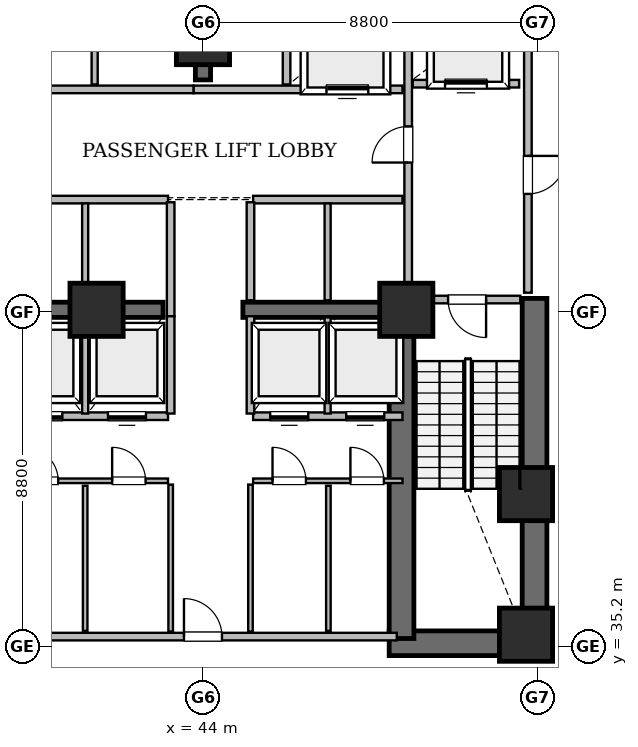
"""IFC4 building model, lengths in metres.
Left out: names, types, materials, properties, quantities, classifications, styles, units other than length and angle.
Written with IfcOpenShell. Run it as: python <this file> out.ifc"""

import sys

from ifc_helpers import new_model, si_unit, direction, frame, frame_2d, origin, origin_2d, place, context, subcontext, project, spatial, rectangle, extrude, element, fill, save


model = new_model("IFC4")
c1 = context("Model", 3, precision=1e-05, world=origin(), true_north=direction((0.0, 1.0)))
c2 = subcontext(c1, "Body", "Model", "MODEL_VIEW")
j1 = project(units=[si_unit("LENGTHUNIT", "METRE"), si_unit("PLANEANGLEUNIT", "RADIAN")], contexts=[c1])
p1 = place(None, origin())
s1 = spatial("IfcSite", under=j1, at=p1, CompositionType="ELEMENT")
p2 = place(p1, origin())
s2 = spatial("IfcBuilding", under=s1, at=p2, CompositionType="ELEMENT")
p3 = place(p2, frame((0.0, 0.0, 9.6)))
s3 = spatial("IfcBuildingStorey", under=s2, at=p3, CompositionType="ELEMENT", Elevation=9.6)
p4 = place(p3, frame((48.9, 35.275, 0.0), z_axis=(0.0, 0.0, 1.0), x_axis=(1.0, 0.0, 0.0)))
e1 = element("IfcWall", 1, at=p4, inside=s3, PredefinedType="SHEAR", context=c2, shape_type="SweptSolid", body=[
    extrude(rectangle(XDim=4.15, YDim=0.65, at=frame_2d((2.075, 0.0))), origin(), (0.0, 0.0, 1.0), 4.5),
])
p5 = place(p3, frame((52.725, 34.95, 0.0), z_axis=(0.0, 0.0, 1.0), x_axis=(0.0, 1.0, 0.0)))
e2 = element("IfcWall", 2, at=p5, inside=s3, PredefinedType="SHEAR", context=c2, shape_type="SweptSolid", body=[
    extrude(rectangle(XDim=9.4, YDim=0.65, at=frame_2d((4.7, 0.0))), origin(), (0.0, 0.0, 1.0), 4.5),
])
p6 = place(p3, frame((49.225, 35.4, 0.0), z_axis=(0.0, 0.0, 1.0), x_axis=(0.0, 1.0, 0.0)))
e3 = element("IfcWall", 3, at=p6, inside=s3, PredefinedType="SHEAR", context=c2, shape_type="SweptSolid", body=[
    extrude(rectangle(XDim=8.95, YDim=0.65, at=frame_2d((4.475, 0.0))), origin(), (0.0, 0.0, 1.0), 4.5),
])
p7 = place(p3, frame((44.0, 50.1, 0.0), z_axis=(0.0, 0.0, 1.0), x_axis=(0.0, 1.0, 0.0)))
e4 = element("IfcWall", 4, at=p7, inside=s3, PredefinedType="SHEAR", context=c2, shape_type="SweptSolid", body=[
    extrude(rectangle(XDim=2.1, YDim=0.4, at=frame_2d((1.05, 0.0))), origin(), (0.0, 0.0, 1.0), 4.5),
])
for number, where, z_axis, x_axis in (
    (5, (38.75, 44.05, 0.0), (0.0, 0.0, 1.0), (1.0, 0.0, 0.0)),
    (6, (45.05, 44.05, 0.0), (0.0, 0.0, 1.0), (1.0, 0.0, 0.0)),
):
    element("IfcWall", number, at=place(p3, frame(where, z_axis=z_axis, x_axis=x_axis)), inside=s3, PredefinedType="SHEAR", context=c2, shape_type="SweptSolid", body=[
        extrude(rectangle(XDim=4.2, YDim=0.4, at=frame_2d((2.1, 0.0))), origin(), (0.0, 0.0, 1.0), 4.5),
    ])
for number, where, z_axis, x_axis in (
    (7, (52.5, 35.5, 0.0), (0.0, 0.0, 1.0), (1.0, 0.0, 0.0)),
    (8, (52.5, 39.2, 0.0), (0.0, 0.0, 1.0), (1.0, 0.0, 0.0)),
    (9, (49.35, 44.05, 0.0), (0.0, 0.0, 1.0), (1.0, 0.0, 0.0)),
    (10, (44.0, 51.2, 0.0), (0.0, 0.0, 1.0), (1.0, 0.0, 0.0)),
    (11, (41.2, 44.05, 0.0), (0.0, 0.0, 1.0), (1.0, 0.0, 0.0)),
):
    element("IfcColumn", number, at=place(p3, frame(where, z_axis=z_axis, x_axis=x_axis)), inside=s3, PredefinedType="COLUMN", context=c2, shape_type="SweptSolid", body=[
        extrude(rectangle(XDim=1.4, YDim=1.4, at=origin_2d()), origin(), (0.0, 0.0, 1.0), 4.8),
    ])
p8 = place(p3, frame((38.9, 35.45, 0.0), z_axis=(0.0, 0.0, 1.0), x_axis=(1.0, 0.0, 0.0)))
e12 = element("IfcWall", 12, at=p8, inside=s3, PredefinedType="SOLIDWALL", context=c2, shape_type="SweptSolid", body=[
    extrude(rectangle(XDim=10.2, YDim=0.2, at=frame_2d((5.1, 0.0))), origin(), (0.0, 0.0, 1.0), 4.5),
])
p9 = place(p8, frame((4.6, 0.0, 0.0)))
e13 = element("IfcOpeningElement", 13, at=p9, cuts=e12, PredefinedType="OPENING", context=c2, shape_type="SweptSolid", body=[
    extrude(rectangle(XDim=1.0, YDim=2.15, at=frame_2d((0.5, 1.075))), frame((0.0, 0.11, 0.0), z_axis=(0.0, -1.0, 0.0), x_axis=(1.0, 0.0, 0.0)), (0.0, 0.0, 1.0), 0.22),
])
p10 = place(p3, frame((52.55, 44.5, 0.0), z_axis=(0.0, 0.0, 1.0), x_axis=(0.0, 1.0, 0.0)))
e14 = element("IfcWall", 14, at=p10, inside=s3, PredefinedType="SOLIDWALL", context=c2, shape_type="SweptSolid", body=[
    extrude(rectangle(XDim=7.92, YDim=0.2, at=frame_2d((3.96, 0.0))), origin(), (0.0, 0.0, 1.0), 4.5),
])
p11 = place(p10, frame((2.6, 0.0, 0.0)))
e15 = element("IfcOpeningElement", 15, at=p11, cuts=e14, PredefinedType="OPENING", context=c2, shape_type="SweptSolid", body=[
    extrude(rectangle(XDim=1.0, YDim=2.15, at=frame_2d((0.5, 1.075))), frame((0.0, 0.11, 0.0), z_axis=(0.0, -1.0, 0.0), x_axis=(1.0, 0.0, 0.0)), (0.0, 0.0, 1.0), 0.22),
])
p12 = place(p3, frame((49.4, 44.5, 0.0), z_axis=(0.0, 0.0, 1.0), x_axis=(0.0, 1.0, 0.0)))
e16 = element("IfcWall", 16, at=p12, inside=s3, PredefinedType="SOLIDWALL", context=c2, shape_type="SweptSolid", body=[
    extrude(rectangle(XDim=7.92, YDim=0.2, at=frame_2d((3.96, 0.0))), origin(), (0.0, 0.0, 1.0), 3.588),
])
p13 = place(p12, frame((3.425, 0.0, 0.0)))
e17 = element("IfcOpeningElement", 17, at=p13, cuts=e16, PredefinedType="OPENING", context=c2, shape_type="SweptSolid", body=[
    extrude(rectangle(XDim=0.95, YDim=2.15, at=frame_2d((0.475, 1.075))), frame((0.0, 0.11, 0.0), z_axis=(0.0, -1.0, 0.0), x_axis=(1.0, 0.0, 0.0)), (0.0, 0.0, 1.0), 0.22),
])
p14 = place(p3, frame((43.75, 49.85, 0.0), z_axis=(0.0, 0.0, 1.0), x_axis=(1.0, 0.0, 0.0)))
e18 = element("IfcWall", 18, at=p14, inside=s3, PredefinedType="SOLIDWALL", context=c2, shape_type="SweptSolid", body=[
    extrude(rectangle(XDim=5.5, YDim=0.2, at=frame_2d((2.75, 0.0))), origin(), (0.0, 0.0, 1.0), 3.588),
])
p15 = place(p14, frame((3.5, 0.0, 0.0)))
e19 = element("IfcOpeningElement", 19, at=p15, cuts=e18, PredefinedType="OPENING", context=c2, shape_type="SweptSolid", body=[
    extrude(rectangle(XDim=1.1, YDim=2.15, at=frame_2d((0.55, 1.075))), frame((0.0, 0.11, 0.0), z_axis=(0.0, -1.0, 0.0), x_axis=(1.0, 0.0, 0.0)), (0.0, 0.0, 1.0), 0.22),
])
p16 = place(p3, frame((38.75, 41.25, 0.0), z_axis=(0.0, 0.0, 1.0), x_axis=(1.0, 0.0, 0.0)))
e20 = element("IfcWall", 20, at=p16, inside=s3, PredefinedType="SOLIDWALL", context=c2, shape_type="SweptSolid", body=[
    extrude(rectangle(XDim=4.33, YDim=0.2, at=frame_2d((2.165, 0.0))), origin(), (0.0, 0.0, 1.0), 4.5),
])
p17 = place(p16, frame((0.55, 0.0, 0.0)))
e21 = element("IfcOpeningElement", 21, at=p17, cuts=e20, PredefinedType="OPENING", context=c2, shape_type="SweptSolid", body=[
    extrude(rectangle(XDim=1.0, YDim=2.15, at=frame_2d((0.5, 1.075))), frame((0.0, 0.11, 0.0), z_axis=(0.0, -1.0, 0.0), x_axis=(1.0, 0.0, 0.0)), (0.0, 0.0, 1.0), 0.22),
])
p18 = place(p16, frame((2.75, 0.0, 0.0)))
e22 = element("IfcOpeningElement", 22, at=p18, cuts=e20, PredefinedType="OPENING", context=c2, shape_type="SweptSolid", body=[
    extrude(rectangle(XDim=1.0, YDim=2.15, at=frame_2d((0.5, 1.075))), frame((0.0, 0.11, 0.0), z_axis=(0.0, -1.0, 0.0), x_axis=(1.0, 0.0, 0.0)), (0.0, 0.0, 1.0), 0.22),
])
p19 = place(p3, frame((38.75, 39.55, 0.0), z_axis=(0.0, 0.0, 1.0), x_axis=(1.0, 0.0, 0.0)))
e23 = element("IfcWall", 23, at=p19, inside=s3, PredefinedType="PARTITIONING", context=c2, shape_type="SweptSolid", body=[
    extrude(rectangle(XDim=4.33, YDim=0.12, at=frame_2d((2.165, 0.0))), origin(), (0.0, 0.0, 1.0), 4.5),
])
p20 = place(p19, frame((0.56, 0.0, 0.0)))
e24 = element("IfcOpeningElement", 24, at=p20, cuts=e23, PredefinedType="OPENING", context=c2, shape_type="SweptSolid", body=[
    extrude(rectangle(XDim=0.88, YDim=2.1, at=frame_2d((0.44, 1.05))), frame((0.0, 0.07, 0.0), z_axis=(0.0, -1.0, 0.0), x_axis=(1.0, 0.0, 0.0)), (0.0, 0.0, 1.0), 0.14),
])
p21 = place(p19, frame((2.86, 0.0, 0.0)))
e25 = element("IfcOpeningElement", 25, at=p21, cuts=e23, PredefinedType="OPENING", context=c2, shape_type="SweptSolid", body=[
    extrude(rectangle(XDim=0.88, YDim=2.1, at=frame_2d((0.44, 1.05))), frame((0.0, 0.07, 0.0), z_axis=(0.0, -1.0, 0.0), x_axis=(1.0, 0.0, 0.0)), (0.0, 0.0, 1.0), 0.14),
])
p22 = place(p3, frame((45.32, 41.25, 0.0), z_axis=(0.0, 0.0, 1.0), x_axis=(1.0, 0.0, 0.0)))
e26 = element("IfcWall", 26, at=p22, inside=s3, PredefinedType="SOLIDWALL", context=c2, shape_type="SweptSolid", body=[
    extrude(rectangle(XDim=3.93, YDim=0.2, at=frame_2d((1.965, 0.0))), origin(), (0.0, 0.0, 1.0), 4.5),
])
p23 = place(p22, frame((0.45, 0.0, 0.0)))
e27 = element("IfcOpeningElement", 27, at=p23, cuts=e26, PredefinedType="OPENING", context=c2, shape_type="SweptSolid", body=[
    extrude(rectangle(XDim=1.0, YDim=2.15, at=frame_2d((0.5, 1.075))), frame((0.0, 0.11, 0.0), z_axis=(0.0, -1.0, 0.0), x_axis=(1.0, 0.0, 0.0)), (0.0, 0.0, 1.0), 0.22),
])
p24 = place(p22, frame((2.45, 0.0, 0.0)))
e28 = element("IfcOpeningElement", 28, at=p24, cuts=e26, PredefinedType="OPENING", context=c2, shape_type="SweptSolid", body=[
    extrude(rectangle(XDim=1.0, YDim=2.15, at=frame_2d((0.5, 1.075))), frame((0.0, 0.11, 0.0), z_axis=(0.0, -1.0, 0.0), x_axis=(1.0, 0.0, 0.0)), (0.0, 0.0, 1.0), 0.22),
])
p25 = place(p3, frame((45.32, 39.55, 0.0), z_axis=(0.0, 0.0, 1.0), x_axis=(1.0, 0.0, 0.0)))
e29 = element("IfcWall", 29, at=p25, inside=s3, PredefinedType="PARTITIONING", context=c2, shape_type="SweptSolid", body=[
    extrude(rectangle(XDim=3.93, YDim=0.12, at=frame_2d((1.965, 0.0))), origin(), (0.0, 0.0, 1.0), 4.5),
])
p26 = place(p25, frame((0.51, 0.0, 0.0)))
e30 = element("IfcOpeningElement", 30, at=p26, cuts=e29, PredefinedType="OPENING", context=c2, shape_type="SweptSolid", body=[
    extrude(rectangle(XDim=0.88, YDim=2.1, at=frame_2d((0.44, 1.05))), frame((0.0, 0.07, 0.0), z_axis=(0.0, -1.0, 0.0), x_axis=(1.0, 0.0, 0.0)), (0.0, 0.0, 1.0), 0.14),
])
p27 = place(p25, frame((2.56, 0.0, 0.0)))
e31 = element("IfcOpeningElement", 31, at=p27, cuts=e29, PredefinedType="OPENING", context=c2, shape_type="SweptSolid", body=[
    extrude(rectangle(XDim=0.88, YDim=2.1, at=frame_2d((0.44, 1.05))), frame((0.0, 0.07, 0.0), z_axis=(0.0, -1.0, 0.0), x_axis=(1.0, 0.0, 0.0)), (0.0, 0.0, 1.0), 0.14),
])
p28 = place(p3, frame((49.55, 44.32, 0.0), z_axis=(0.0, 0.0, 1.0), x_axis=(1.0, 0.0, 0.0)))
e32 = element("IfcWall", 32, at=p28, inside=s3, PredefinedType="SOLIDWALL", context=c2, shape_type="SweptSolid", body=[
    extrude(rectangle(XDim=2.8, YDim=0.2, at=frame_2d((1.4, 0.0))), origin(), (0.0, 0.0, 1.0), 3.588),
])
p29 = place(p28, frame((0.9, 0.0, 0.0)))
e33 = element("IfcOpeningElement", 33, at=p29, cuts=e32, PredefinedType="OPENING", context=c2, shape_type="SweptSolid", body=[
    extrude(rectangle(XDim=1.0, YDim=2.15, at=frame_2d((0.5, 1.075))), frame((0.0, 0.11, 0.0), z_axis=(0.0, -1.0, 0.0), x_axis=(1.0, 0.0, 0.0)), (0.0, 0.0, 1.0), 0.22),
])
p30 = place(p3, frame((49.52, 50.0, 0.0), z_axis=(0.0, 0.0, 1.0), x_axis=(1.0, 0.0, 0.0)))
e34 = element("IfcWall", 34, at=p30, inside=s3, PredefinedType="SOLIDWALL", context=c2, shape_type="SweptSolid", body=[
    extrude(rectangle(XDim=2.8, YDim=0.2, at=frame_2d((1.4, 0.0))), origin(), (0.0, 0.0, 1.0), 4.5),
])
p31 = place(p30, frame((0.85, 0.0, 0.0)))
e35 = element("IfcOpeningElement", 35, at=p31, cuts=e34, PredefinedType="OPENING", context=c2, shape_type="SweptSolid", body=[
    extrude(rectangle(XDim=1.1, YDim=2.15, at=frame_2d((0.55, 1.075))), frame((0.0, 0.11, 0.0), z_axis=(0.0, -1.0, 0.0), x_axis=(1.0, 0.0, 0.0)), (0.0, 0.0, 1.0), 0.22),
])
p32 = place(p3, frame((38.75, 49.85, 0.0), z_axis=(0.0, 0.0, 1.0), x_axis=(1.0, 0.0, 0.0)))
e36 = element("IfcWall", 36, at=p32, inside=s3, PredefinedType="SOLIDWALL", context=c2, shape_type="SweptSolid", body=[
    extrude(rectangle(XDim=5.0, YDim=0.2, at=frame_2d((2.5, 0.0))), origin(), (0.0, 0.0, 1.0), 4.5),
])
p33 = place(p3, frame((38.75, 46.95, 0.0), z_axis=(0.0, 0.0, 1.0), x_axis=(1.0, 0.0, 0.0)))
e37 = element("IfcWall", 37, at=p33, inside=s3, PredefinedType="SOLIDWALL", context=c2, shape_type="SweptSolid", body=[
    extrude(rectangle(XDim=4.33, YDim=0.2, at=frame_2d((2.165, 0.0))), origin(), (0.0, 0.0, 1.0), 4.5),
])
p34 = place(p3, frame((45.32, 46.95, 0.0), z_axis=(0.0, 0.0, 1.0), x_axis=(1.0, 0.0, 0.0)))
e38 = element("IfcWall", 38, at=p34, inside=s3, PredefinedType="SOLIDWALL", context=c2, shape_type="SweptSolid", body=[
    extrude(rectangle(XDim=3.93, YDim=0.2, at=frame_2d((1.965, 0.0))), origin(), (0.0, 0.0, 1.0), 3.588),
])
for number, where, z_axis, x_axis in (
    (39, (43.15, 35.58, 0.0), (0.0, 0.0, 1.0), (0.0, 1.0, 0.0)),
    (40, (45.25, 35.58, 0.0), (0.0, 0.0, 1.0), (0.0, 1.0, 0.0)),
):
    element("IfcWall", number, at=place(p3, frame(where, z_axis=z_axis, x_axis=x_axis)), inside=s3, PredefinedType="PARTITIONING", context=c2, shape_type="SweptSolid", body=[
        extrude(rectangle(XDim=3.87, YDim=0.12, at=frame_2d((1.935, 0.0))), origin(), (0.0, 0.0, 1.0), 4.5),
    ])
for number, where, z_axis, x_axis in (
    (41, (40.9, 35.6, 0.0), (0.0, 0.0, 1.0), (0.0, 1.0, 0.0)),
    (42, (47.3, 35.6, 0.0), (0.0, 0.0, 1.0), (0.0, 1.0, 0.0)),
):
    element("IfcWall", number, at=place(p3, frame(where, z_axis=z_axis, x_axis=x_axis)), inside=s3, PredefinedType="PARTITIONING", context=c2, shape_type="SweptSolid", body=[
        extrude(rectangle(XDim=3.82, YDim=0.12, at=frame_2d((1.91, 0.0))), origin(), (0.0, 0.0, 1.0), 4.5),
    ])
p35 = place(p3, frame((43.15, 43.88, 0.0), z_axis=(0.0, 0.0, 1.0), x_axis=(0.0, 1.0, 0.0)))
e43 = element("IfcWall", 43, at=p35, inside=s3, PredefinedType="SOLIDWALL", context=c2, shape_type="SweptSolid", body=[
    extrude(rectangle(XDim=3.0, YDim=0.2, at=frame_2d((1.5, 0.0))), origin(), (0.0, 0.0, 1.0), 4.5),
])
p36 = place(p3, frame((45.25, 44.3, 0.0), z_axis=(0.0, 0.0, 1.0), x_axis=(0.0, 1.0, 0.0)))
e44 = element("IfcWall", 44, at=p36, inside=s3, PredefinedType="SOLIDWALL", context=c2, shape_type="SweptSolid", body=[
    extrude(rectangle(XDim=2.58, YDim=0.2, at=frame_2d((1.29, 0.0))), origin(), (0.0, 0.0, 1.0), 4.5),
])
for number, where, z_axis, x_axis in (
    (45, (43.15, 41.32, 0.0), (0.0, 0.0, 1.0), (0.0, 1.0, 0.0)),
    (46, (45.25, 41.32, 0.0), (0.0, 0.0, 1.0), (0.0, 1.0, 0.0)),
):
    element("IfcWall", number, at=place(p3, frame(where, z_axis=z_axis, x_axis=x_axis)), inside=s3, PredefinedType="SOLIDWALL", context=c2, shape_type="SweptSolid", body=[
        extrude(rectangle(XDim=2.56, YDim=0.2, at=frame_2d((1.28, 0.0))), origin(), (0.0, 0.0, 1.0), 4.5),
    ])
p37 = place(p3, frame((40.9, 44.3, 0.0), z_axis=(0.0, 0.0, 1.0), x_axis=(0.0, 1.0, 0.0)))
e47 = element("IfcWall", 47, at=p37, inside=s3, PredefinedType="SOLIDWALL", context=c2, shape_type="SweptSolid", body=[
    extrude(rectangle(XDim=2.55, YDim=0.16, at=frame_2d((1.275, 0.0))), origin(), (0.0, 0.0, 1.0), 4.5),
])
p38 = place(p3, frame((47.28, 44.3, 0.0), z_axis=(0.0, 0.0, 1.0), x_axis=(0.0, 1.0, 0.0)))
e48 = element("IfcWall", 48, at=p38, inside=s3, PredefinedType="SOLIDWALL", context=c2, shape_type="SweptSolid", body=[
    extrude(rectangle(XDim=2.55, YDim=0.16, at=frame_2d((1.275, 0.0))), origin(), (0.0, 0.0, 1.0), 3.588),
])
for number, where, z_axis, x_axis in (
    (49, (40.9, 41.32, 0.0), (0.0, 0.0, 1.0), (0.0, 1.0, 0.0)),
    (50, (47.28, 41.32, 0.0), (0.0, 0.0, 1.0), (0.0, 1.0, 0.0)),
):
    element("IfcWall", number, at=place(p3, frame(where, z_axis=z_axis, x_axis=x_axis)), inside=s3, PredefinedType="SOLIDWALL", context=c2, shape_type="SweptSolid", body=[
        extrude(rectangle(XDim=2.53, YDim=0.16, at=frame_2d((1.265, 0.0))), origin(), (0.0, 0.0, 1.0), 4.5),
    ])
p39 = place(p3, frame((41.15, 49.98, 0.0), z_axis=(0.0, 0.0, 1.0), x_axis=(0.0, 1.0, 0.0)))
e51 = element("IfcWall", 51, at=p39, inside=s3, PredefinedType="SOLIDWALL", context=c2, shape_type="SweptSolid", body=[
    extrude(rectangle(XDim=2.37, YDim=0.16, at=frame_2d((1.185, 0.0))), origin(), (0.0, 0.0, 1.0), 4.5),
])
p40 = place(p3, frame((46.2, 49.98, 0.0), z_axis=(0.0, 0.0, 1.0), x_axis=(0.0, 1.0, 0.0)))
e52 = element("IfcWall", 52, at=p40, inside=s3, PredefinedType="SOLIDWALL", context=c2, shape_type="SweptSolid", body=[
    extrude(rectangle(XDim=2.37, YDim=0.2, at=frame_2d((1.185, 0.0))), origin(), (0.0, 0.0, 1.0), 4.5),
])
p41 = place(p29, frame((1.0, 0.0, 0.0), z_axis=(0.0, 0.0, 1.0), x_axis=(-1.0, 0.0, 0.0)))
e53 = element("IfcDoor", 53, at=p41, inside=s3, OperationType="SINGLE_SWING_RIGHT", PredefinedType="DOOR", context=c2, shape_type="SweptSolid", body=[
    extrude(rectangle(XDim=1.0, YDim=2.15, at=frame_2d((0.5, 1.075))), frame((0.0, 0.025, 0.0), z_axis=(0.0, -1.0, 0.0), x_axis=(1.0, 0.0, 0.0)), (0.0, 0.0, 1.0), 0.05),
])
fill(e33, e53)
p42 = place(p11, frame((1.0, 0.0, 0.0), z_axis=(0.0, 0.0, 1.0), x_axis=(-1.0, 0.0, 0.0)))
e54 = element("IfcDoor", 54, at=p42, inside=s3, OperationType="SINGLE_SWING_RIGHT", PredefinedType="DOOR", context=c2, shape_type="SweptSolid", body=[
    extrude(rectangle(XDim=1.0, YDim=2.15, at=frame_2d((0.5, 1.075))), frame((0.0, 0.025, 0.0), z_axis=(0.0, -1.0, 0.0), x_axis=(1.0, 0.0, 0.0)), (0.0, 0.0, 1.0), 0.05),
])
fill(e15, e54)
p43 = place(p13, origin())
e55 = element("IfcDoor", 55, at=p43, inside=s3, OperationType="SINGLE_SWING_LEFT", PredefinedType="DOOR", context=c2, shape_type="SweptSolid", body=[
    extrude(rectangle(XDim=0.95, YDim=2.15, at=frame_2d((0.475, 1.075))), frame((0.0, 0.025, 0.0), z_axis=(0.0, -1.0, 0.0), x_axis=(1.0, 0.0, 0.0)), (0.0, 0.0, 1.0), 0.05),
])
fill(e17, e55)
p44 = place(p31, origin())
e56 = element("IfcDoor", 56, at=p44, inside=s3, OperationType="SLIDING_TO_LEFT", PredefinedType="DOOR", context=c2, shape_type="SweptSolid", body=[
    extrude(rectangle(XDim=1.1, YDim=2.15, at=frame_2d((0.55, 1.075))), frame((0.0, 0.025, 0.0), z_axis=(0.0, -1.0, 0.0), x_axis=(1.0, 0.0, 0.0)), (0.0, 0.0, 1.0), 0.05),
])
fill(e35, e56)
p45 = place(p9, origin())
e57 = element("IfcDoor", 57, at=p45, inside=s3, OperationType="SINGLE_SWING_LEFT", PredefinedType="DOOR", context=c2, shape_type="SweptSolid", body=[
    extrude(rectangle(XDim=1.0, YDim=2.15, at=frame_2d((0.5, 1.075))), frame((0.0, 0.025, 0.0), z_axis=(0.0, -1.0, 0.0), x_axis=(1.0, 0.0, 0.0)), (0.0, 0.0, 1.0), 0.05),
])
fill(e13, e57)
p46 = place(p15, origin())
e58 = element("IfcDoor", 58, at=p46, inside=s3, OperationType="SLIDING_TO_LEFT", PredefinedType="DOOR", context=c2, shape_type="SweptSolid", body=[
    extrude(rectangle(XDim=1.1, YDim=2.15, at=frame_2d((0.55, 1.075))), frame((0.0, 0.025, 0.0), z_axis=(0.0, -1.0, 0.0), x_axis=(1.0, 0.0, 0.0)), (0.0, 0.0, 1.0), 0.05),
])
fill(e19, e58)
p47 = place(p17, frame((1.0, 0.0, 0.0), z_axis=(0.0, 0.0, 1.0), x_axis=(-1.0, 0.0, 0.0)))
e59 = element("IfcDoor", 59, at=p47, inside=s3, OperationType="SLIDING_TO_LEFT", PredefinedType="DOOR", context=c2, shape_type="SweptSolid", body=[
    extrude(rectangle(XDim=1.0, YDim=2.15, at=frame_2d((0.5, 1.075))), frame((0.0, 0.025, 0.0), z_axis=(0.0, -1.0, 0.0), x_axis=(1.0, 0.0, 0.0)), (0.0, 0.0, 1.0), 0.05),
])
fill(e21, e59)
p48 = place(p18, frame((1.0, 0.0, 0.0), z_axis=(0.0, 0.0, 1.0), x_axis=(-1.0, 0.0, 0.0)))
e60 = element("IfcDoor", 60, at=p48, inside=s3, OperationType="SLIDING_TO_LEFT", PredefinedType="DOOR", context=c2, shape_type="SweptSolid", body=[
    extrude(rectangle(XDim=1.0, YDim=2.15, at=frame_2d((0.5, 1.075))), frame((0.0, 0.025, 0.0), z_axis=(0.0, -1.0, 0.0), x_axis=(1.0, 0.0, 0.0)), (0.0, 0.0, 1.0), 0.05),
])
fill(e22, e60)
p49 = place(p23, frame((1.0, 0.0, 0.0), z_axis=(0.0, 0.0, 1.0), x_axis=(-1.0, 0.0, 0.0)))
e61 = element("IfcDoor", 61, at=p49, inside=s3, OperationType="SLIDING_TO_LEFT", PredefinedType="DOOR", context=c2, shape_type="SweptSolid", body=[
    extrude(rectangle(XDim=1.0, YDim=2.15, at=frame_2d((0.5, 1.075))), frame((0.0, 0.025, 0.0), z_axis=(0.0, -1.0, 0.0), x_axis=(1.0, 0.0, 0.0)), (0.0, 0.0, 1.0), 0.05),
])
fill(e27, e61)
p50 = place(p24, frame((1.0, 0.0, 0.0), z_axis=(0.0, 0.0, 1.0), x_axis=(-1.0, 0.0, 0.0)))
e62 = element("IfcDoor", 62, at=p50, inside=s3, OperationType="SLIDING_TO_LEFT", PredefinedType="DOOR", context=c2, shape_type="SweptSolid", body=[
    extrude(rectangle(XDim=1.0, YDim=2.15, at=frame_2d((0.5, 1.075))), frame((0.0, 0.025, 0.0), z_axis=(0.0, -1.0, 0.0), x_axis=(1.0, 0.0, 0.0)), (0.0, 0.0, 1.0), 0.05),
])
fill(e28, e62)
p51 = place(p20, origin())
e63 = element("IfcDoor", 63, at=p51, inside=s3, OperationType="SINGLE_SWING_LEFT", PredefinedType="DOOR", context=c2, shape_type="SweptSolid", body=[
    extrude(rectangle(XDim=0.88, YDim=2.1, at=frame_2d((0.44, 1.05))), frame((0.0, 0.025, 0.0), z_axis=(0.0, -1.0, 0.0), x_axis=(1.0, 0.0, 0.0)), (0.0, 0.0, 1.0), 0.05),
])
fill(e24, e63)
p52 = place(p21, origin())
e64 = element("IfcDoor", 64, at=p52, inside=s3, OperationType="SINGLE_SWING_LEFT", PredefinedType="DOOR", context=c2, shape_type="SweptSolid", body=[
    extrude(rectangle(XDim=0.88, YDim=2.1, at=frame_2d((0.44, 1.05))), frame((0.0, 0.025, 0.0), z_axis=(0.0, -1.0, 0.0), x_axis=(1.0, 0.0, 0.0)), (0.0, 0.0, 1.0), 0.05),
])
fill(e25, e64)
p53 = place(p26, origin())
e65 = element("IfcDoor", 65, at=p53, inside=s3, OperationType="SINGLE_SWING_LEFT", PredefinedType="DOOR", context=c2, shape_type="SweptSolid", body=[
    extrude(rectangle(XDim=0.88, YDim=2.1, at=frame_2d((0.44, 1.05))), frame((0.0, 0.025, 0.0), z_axis=(0.0, -1.0, 0.0), x_axis=(1.0, 0.0, 0.0)), (0.0, 0.0, 1.0), 0.05),
])
fill(e30, e65)
p54 = place(p27, origin())
e66 = element("IfcDoor", 66, at=p54, inside=s3, OperationType="SINGLE_SWING_LEFT", PredefinedType="DOOR", context=c2, shape_type="SweptSolid", body=[
    extrude(rectangle(XDim=0.88, YDim=2.1, at=frame_2d((0.44, 1.05))), frame((0.0, 0.025, 0.0), z_axis=(0.0, -1.0, 0.0), x_axis=(1.0, 0.0, 0.0)), (0.0, 0.0, 1.0), 0.05),
])
fill(e31, e66)
save(model, sys.argv[1])
